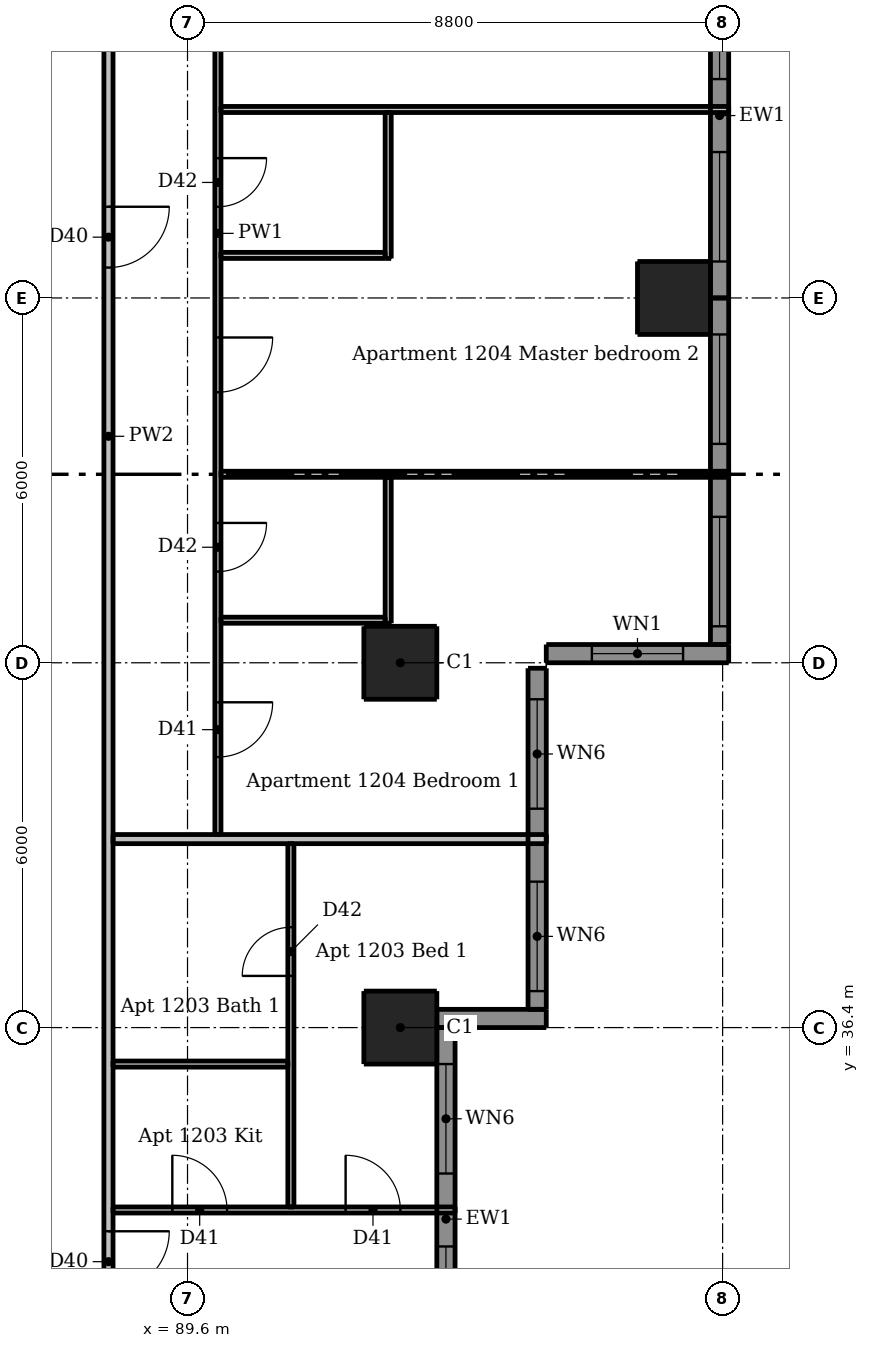
"""IFC4 building model, lengths in metres.
Left out: names, types, materials, properties, quantities, classifications, styles, units other than length and angle.
Written with IfcOpenShell. Run it as: python <this file> out.ifc"""

import sys

from ifc_helpers import new_model, si_unit, direction, frame, frame_2d, origin, origin_2d, place, context, subcontext, project, spatial, rectangle, extrude, element, fill, save


model = new_model("IFC4")
c1 = context("Model", 3, precision=1e-05, world=origin(), true_north=direction((0.0, 1.0)))
c2 = subcontext(c1, "Body", "Model", "MODEL_VIEW")
j1 = project(units=[si_unit("LENGTHUNIT", "METRE"), si_unit("PLANEANGLEUNIT", "RADIAN")], contexts=[c1])
p1 = place(None, origin())
s1 = spatial("IfcSite", under=j1, at=p1, CompositionType="ELEMENT")
p2 = place(p1, origin())
s2 = spatial("IfcBuilding", under=s1, at=p2, CompositionType="ELEMENT")
p3 = place(p2, frame((0.0, 0.0, 46.6)))
s3 = spatial("IfcBuildingStorey", under=s2, at=p3, CompositionType="ELEMENT", Elevation=46.6)
for number, where, z_axis, x_axis in (
    (1, (93.1, 36.4, 0.0), (0.0, 0.0, 1.0), (1.0, 0.0, 0.0)),
    (2, (93.1, 42.4, 0.0), (0.0, 0.0, 1.0), (1.0, 0.0, 0.0)),
    (3, (97.6, 48.4, 0.0), (0.0, 0.0, 1.0), (1.0, 0.0, 0.0)),
):
    element("IfcColumn", number, at=place(p3, frame(where, z_axis=z_axis, x_axis=x_axis)), inside=s3, PredefinedType="COLUMN", context=c2, shape_type="SweptSolid", body=[
        extrude(rectangle(XDim=1.2, YDim=1.2, at=origin_2d()), origin(), (0.0, 0.0, 1.0), 3.05),
    ])
p4 = place(p3, frame((93.7, 36.55, 0.0), z_axis=(0.0, 0.0, 1.0), x_axis=(1.0, 0.0, 0.0)))
e4 = element("IfcWall", 4, at=p4, inside=s3, PredefinedType="SOLIDWALL", context=c2, shape_type="SweptSolid", body=[
    extrude(rectangle(XDim=1.8, YDim=0.3, at=frame_2d((0.9, 0.0))), origin(), (0.0, 0.0, 1.0), 3.05),
])
p5 = place(p3, frame((95.5, 42.55, 0.0), z_axis=(0.0, 0.0, 1.0), x_axis=(1.0, 0.0, 0.0)))
e5 = element("IfcWall", 5, at=p5, inside=s3, PredefinedType="SOLIDWALL", context=c2, shape_type="SweptSolid", body=[
    extrude(rectangle(XDim=3.0, YDim=0.3, at=frame_2d((1.5, 0.0))), origin(), (0.0, 0.0, 1.0), 3.05),
])
p6 = place(p5, frame((0.75, 0.0, 0.9)))
e6 = element("IfcOpeningElement", 6, at=p6, cuts=e5, PredefinedType="OPENING", context=c2, shape_type="SweptSolid", body=[
    extrude(rectangle(XDim=1.5, YDim=1.5, at=frame_2d((0.75, 0.75))), frame((0.0, 0.16, 0.0), z_axis=(0.0, -1.0, 0.0), x_axis=(1.0, 0.0, 0.0)), (0.0, 0.0, 1.0), 0.32),
])
p7 = place(p3, frame((93.85, 30.1, 0.0), z_axis=(0.0, 0.0, 1.0), x_axis=(0.0, 1.0, 0.0)))
e7 = element("IfcWall", 7, at=p7, inside=s3, PredefinedType="SOLIDWALL", context=c2, shape_type="SweptSolid", body=[
    extrude(rectangle(XDim=6.3, YDim=0.3, at=frame_2d((3.15, 0.0))), origin(), (0.0, 0.0, 1.0), 3.05),
])
p8 = place(p7, frame((0.9, 0.0, 0.15)))
e8 = element("IfcOpeningElement", 8, at=p8, cuts=e7, PredefinedType="OPENING", context=c2, shape_type="SweptSolid", body=[
    extrude(rectangle(XDim=1.8, YDim=2.1, at=frame_2d((0.9, 1.05))), frame((0.0, 0.16, 0.0), z_axis=(0.0, -1.0, 0.0), x_axis=(1.0, 0.0, 0.0)), (0.0, 0.0, 1.0), 0.32),
])
p9 = place(p7, frame((3.9, 0.0, 0.15)))
e9 = element("IfcOpeningElement", 9, at=p9, cuts=e7, PredefinedType="OPENING", context=c2, shape_type="SweptSolid", body=[
    extrude(rectangle(XDim=1.8, YDim=2.1, at=frame_2d((0.9, 1.05))), frame((0.0, 0.16, 0.0), z_axis=(0.0, -1.0, 0.0), x_axis=(1.0, 0.0, 0.0)), (0.0, 0.0, 1.0), 0.32),
])
p10 = place(p3, frame((95.35, 36.7, 0.0), z_axis=(0.0, 0.0, 1.0), x_axis=(0.0, 1.0, 0.0)))
e10 = element("IfcWall", 10, at=p10, inside=s3, PredefinedType="SOLIDWALL", context=c2, shape_type="SweptSolid", body=[
    extrude(rectangle(XDim=5.61, YDim=0.3, at=frame_2d((2.805, 0.0))), origin(), (0.0, 0.0, 1.0), 3.05),
])
p11 = place(p10, frame((0.3, 0.0, 0.15)))
e11 = element("IfcOpeningElement", 11, at=p11, cuts=e10, PredefinedType="OPENING", context=c2, shape_type="SweptSolid", body=[
    extrude(rectangle(XDim=1.8, YDim=2.1, at=frame_2d((0.9, 1.05))), frame((0.0, 0.16, 0.0), z_axis=(0.0, -1.0, 0.0), x_axis=(1.0, 0.0, 0.0)), (0.0, 0.0, 1.0), 0.32),
])
p12 = place(p10, frame((3.3, 0.0, 0.15)))
e12 = element("IfcOpeningElement", 12, at=p12, cuts=e10, PredefinedType="OPENING", context=c2, shape_type="SweptSolid", body=[
    extrude(rectangle(XDim=1.8, YDim=2.1, at=frame_2d((0.9, 1.05))), frame((0.0, 0.16, 0.0), z_axis=(0.0, -1.0, 0.0), x_axis=(1.0, 0.0, 0.0)), (0.0, 0.0, 1.0), 0.32),
])
p13 = place(p3, frame((98.35, 42.7, 0.0), z_axis=(0.0, 0.0, 1.0), x_axis=(0.0, 1.0, 0.0)))
e13 = element("IfcWall", 13, at=p13, inside=s3, PredefinedType="SOLIDWALL", context=c2, shape_type="SweptSolid", body=[
    extrude(rectangle(XDim=5.7, YDim=0.3, at=frame_2d((2.85, 0.0))), origin(), (0.0, 0.0, 1.0), 3.05),
])
p14 = place(p13, frame((0.3, 0.0, 0.15)))
e14 = element("IfcOpeningElement", 14, at=p14, cuts=e13, PredefinedType="OPENING", context=c2, shape_type="SweptSolid", body=[
    extrude(rectangle(XDim=1.8, YDim=2.1, at=frame_2d((0.9, 1.05))), frame((0.0, 0.16, 0.0), z_axis=(0.0, -1.0, 0.0), x_axis=(1.0, 0.0, 0.0)), (0.0, 0.0, 1.0), 0.32),
])
p15 = place(p13, frame((3.3, 0.0, 0.15)))
e15 = element("IfcOpeningElement", 15, at=p15, cuts=e13, PredefinedType="OPENING", context=c2, shape_type="SweptSolid", body=[
    extrude(rectangle(XDim=1.8, YDim=2.1, at=frame_2d((0.9, 1.05))), frame((0.0, 0.16, 0.0), z_axis=(0.0, -1.0, 0.0), x_axis=(1.0, 0.0, 0.0)), (0.0, 0.0, 1.0), 0.32),
])
p16 = place(p3, frame((98.35, 48.4, 0.0), z_axis=(0.0, 0.0, 1.0), x_axis=(0.0, 1.0, 0.0)))
e16 = element("IfcWall", 16, at=p16, inside=s3, PredefinedType="SOLIDWALL", context=c2, shape_type="SweptSolid", body=[
    extrude(rectangle(XDim=6.0, YDim=0.3, at=frame_2d((3.0, 0.0))), origin(), (0.0, 0.0, 1.0), 3.05),
])
p17 = place(p16, frame((0.6, 0.0, 0.15)))
e17 = element("IfcOpeningElement", 17, at=p17, cuts=e16, PredefinedType="OPENING", context=c2, shape_type="SweptSolid", body=[
    extrude(rectangle(XDim=1.8, YDim=2.1, at=frame_2d((0.9, 1.05))), frame((0.0, 0.16, 0.0), z_axis=(0.0, -1.0, 0.0), x_axis=(1.0, 0.0, 0.0)), (0.0, 0.0, 1.0), 0.32),
])
p18 = place(p16, frame((3.6, 0.0, 0.15)))
e18 = element("IfcOpeningElement", 18, at=p18, cuts=e16, PredefinedType="OPENING", context=c2, shape_type="SweptSolid", body=[
    extrude(rectangle(XDim=1.8, YDim=2.1, at=frame_2d((0.9, 1.05))), frame((0.0, 0.16, 0.0), z_axis=(0.0, -1.0, 0.0), x_axis=(1.0, 0.0, 0.0)), (0.0, 0.0, 1.0), 0.32),
])
p19 = place(p3, frame((90.1, 59.35, 0.0), z_axis=(0.0, 0.0, 1.0), x_axis=(0.0, -1.0, 0.0)))
e19 = element("IfcWall", 19, at=p19, inside=s3, PredefinedType="PARTITIONING", context=c2, shape_type="SweptSolid", body=[
    extrude(rectangle(XDim=19.775, YDim=0.1, at=frame_2d((9.888, 0.0))), origin(), (0.0, 0.0, 1.0), 3.05),
])
p20 = place(p19, frame((4.45, 0.0, 0.0)))
e20 = element("IfcOpeningElement", 20, at=p20, cuts=e19, PredefinedType="OPENING", context=c2, shape_type="SweptSolid", body=[
    extrude(rectangle(XDim=0.9, YDim=2.1, at=frame_2d((0.45, 1.05))), frame((0.0, 0.06, 0.0), z_axis=(0.0, -1.0, 0.0), x_axis=(1.0, 0.0, 0.0)), (0.0, 0.0, 1.0), 0.12),
])
p21 = place(p19, frame((0.55, 0.0, 0.0)))
e21 = element("IfcOpeningElement", 21, at=p21, cuts=e19, PredefinedType="OPENING", context=c2, shape_type="SweptSolid", body=[
    extrude(rectangle(XDim=0.9, YDim=2.1, at=frame_2d((0.45, 1.05))), frame((0.0, 0.06, 0.0), z_axis=(0.0, -1.0, 0.0), x_axis=(1.0, 0.0, 0.0)), (0.0, 0.0, 1.0), 0.12),
])
p22 = place(p19, frame((17.6, 0.0, 0.0)))
e22 = element("IfcOpeningElement", 22, at=p22, cuts=e19, PredefinedType="OPENING", context=c2, shape_type="SweptSolid", body=[
    extrude(rectangle(XDim=0.9, YDim=2.1, at=frame_2d((0.45, 1.05))), frame((0.0, 0.06, 0.0), z_axis=(0.0, -1.0, 0.0), x_axis=(1.0, 0.0, 0.0)), (0.0, 0.0, 1.0), 0.12),
])
p23 = place(p19, frame((11.6, 0.0, 0.0)))
e23 = element("IfcOpeningElement", 23, at=p23, cuts=e19, PredefinedType="OPENING", context=c2, shape_type="SweptSolid", body=[
    extrude(rectangle(XDim=0.9, YDim=2.1, at=frame_2d((0.45, 1.05))), frame((0.0, 0.06, 0.0), z_axis=(0.0, -1.0, 0.0), x_axis=(1.0, 0.0, 0.0)), (0.0, 0.0, 1.0), 0.12),
])
p24 = place(p19, frame((14.65, 0.0, 0.0)))
e24 = element("IfcOpeningElement", 24, at=p24, cuts=e19, PredefinedType="OPENING", context=c2, shape_type="SweptSolid", body=[
    extrude(rectangle(XDim=0.8, YDim=2.1, at=frame_2d((0.4, 1.05))), frame((0.0, 0.06, 0.0), z_axis=(0.0, -1.0, 0.0), x_axis=(1.0, 0.0, 0.0)), (0.0, 0.0, 1.0), 0.12),
])
p25 = place(p19, frame((8.65, 0.0, 0.0)))
e25 = element("IfcOpeningElement", 25, at=p25, cuts=e19, PredefinedType="OPENING", context=c2, shape_type="SweptSolid", body=[
    extrude(rectangle(XDim=0.8, YDim=2.1, at=frame_2d((0.4, 1.05))), frame((0.0, 0.06, 0.0), z_axis=(0.0, -1.0, 0.0), x_axis=(1.0, 0.0, 0.0)), (0.0, 0.0, 1.0), 0.12),
])
p26 = place(p3, frame((91.3, 33.45, 0.0), z_axis=(0.0, 0.0, 1.0), x_axis=(0.0, 1.0, 0.0)))
e26 = element("IfcWall", 26, at=p26, inside=s3, PredefinedType="PARTITIONING", context=c2, shape_type="SweptSolid", body=[
    extrude(rectangle(XDim=5.975, YDim=0.1, at=frame_2d((2.988, 0.0))), origin(), (0.0, 0.0, 1.0), 3.05),
])
p27 = place(p26, frame((3.8, 0.0, 0.0)))
e27 = element("IfcOpeningElement", 27, at=p27, cuts=e26, PredefinedType="OPENING", context=c2, shape_type="SweptSolid", body=[
    extrude(rectangle(XDim=0.8, YDim=2.1, at=frame_2d((0.4, 1.05))), frame((0.0, 0.06, 0.0), z_axis=(0.0, -1.0, 0.0), x_axis=(1.0, 0.0, 0.0)), (0.0, 0.0, 1.0), 0.12),
])
for number, where, z_axis, x_axis in (
    (28, (92.9, 43.05, 0.0), (0.0, 0.0, 1.0), (0.0, 1.0, 0.0)),
    (29, (92.9, 49.05, 0.0), (0.0, 0.0, 1.0), (0.0, 1.0, 0.0)),
):
    element("IfcWall", number, at=place(p3, frame(where, z_axis=z_axis, x_axis=x_axis)), inside=s3, PredefinedType="PARTITIONING", context=c2, shape_type="SweptSolid", body=[
        extrude(rectangle(XDim=2.4, YDim=0.1, at=frame_2d((1.2, 0.0))), origin(), (0.0, 0.0, 1.0), 3.05),
    ])
p28 = place(p3, frame((90.15, 51.5, 0.0), z_axis=(0.0, 0.0, 1.0), x_axis=(1.0, 0.0, 0.0)))
e30 = element("IfcWall", 30, at=p28, inside=s3, PredefinedType="PARTITIONING", context=c2, shape_type="SweptSolid", body=[
    extrude(rectangle(XDim=8.35, YDim=0.1, at=frame_2d((4.175, 0.0))), origin(), (0.0, 0.0, 1.0), 3.05),
])
p29 = place(p3, frame((90.15, 49.1, 0.0), z_axis=(0.0, 0.0, 1.0), x_axis=(1.0, 0.0, 0.0)))
e31 = element("IfcWall", 31, at=p29, inside=s3, PredefinedType="PARTITIONING", context=c2, shape_type="SweptSolid", body=[
    extrude(rectangle(XDim=2.7, YDim=0.1, at=frame_2d((1.35, 0.0))), origin(), (0.0, 0.0, 1.0), 3.05),
])
p30 = place(p3, frame((90.15, 45.5, 0.0), z_axis=(0.0, 0.0, 1.0), x_axis=(1.0, 0.0, 0.0)))
e32 = element("IfcWall", 32, at=p30, inside=s3, PredefinedType="PARTITIONING", context=c2, shape_type="SweptSolid", body=[
    extrude(rectangle(XDim=8.35, YDim=0.1, at=frame_2d((4.175, 0.0))), origin(), (0.0, 0.0, 1.0), 3.05),
])
p31 = place(p3, frame((90.15, 43.1, 0.0), z_axis=(0.0, 0.0, 1.0), x_axis=(1.0, 0.0, 0.0)))
e33 = element("IfcWall", 33, at=p31, inside=s3, PredefinedType="PARTITIONING", context=c2, shape_type="SweptSolid", body=[
    extrude(rectangle(XDim=2.7, YDim=0.1, at=frame_2d((1.35, 0.0))), origin(), (0.0, 0.0, 1.0), 3.05),
])
p32 = place(p3, frame((88.375, 35.8, 0.0), z_axis=(0.0, 0.0, 1.0), x_axis=(1.0, 0.0, 0.0)))
e34 = element("IfcWall", 34, at=p32, inside=s3, PredefinedType="PARTITIONING", context=c2, shape_type="SweptSolid", body=[
    extrude(rectangle(XDim=2.875, YDim=0.1, at=frame_2d((1.438, 0.0))), origin(), (0.0, 0.0, 1.0), 3.05),
])
p33 = place(p3, frame((88.375, 33.4, 0.0), z_axis=(0.0, 0.0, 1.0), x_axis=(1.0, 0.0, 0.0)))
e35 = element("IfcWall", 35, at=p33, inside=s3, PredefinedType="PARTITIONING", context=c2, shape_type="SweptSolid", body=[
    extrude(rectangle(XDim=5.625, YDim=0.1, at=frame_2d((2.812, 0.0))), origin(), (0.0, 0.0, 1.0), 3.05),
])
p34 = place(p33, frame((0.975, 0.0, 0.0)))
e36 = element("IfcOpeningElement", 36, at=p34, cuts=e35, PredefinedType="OPENING", context=c2, shape_type="SweptSolid", body=[
    extrude(rectangle(XDim=0.9, YDim=2.1, at=frame_2d((0.45, 1.05))), frame((0.0, 0.06, 0.0), z_axis=(0.0, -1.0, 0.0), x_axis=(1.0, 0.0, 0.0)), (0.0, 0.0, 1.0), 0.12),
])
p35 = place(p33, frame((3.825, 0.0, 0.0)))
e37 = element("IfcOpeningElement", 37, at=p35, cuts=e35, PredefinedType="OPENING", context=c2, shape_type="SweptSolid", body=[
    extrude(rectangle(XDim=0.9, YDim=2.1, at=frame_2d((0.45, 1.05))), frame((0.0, 0.06, 0.0), z_axis=(0.0, -1.0, 0.0), x_axis=(1.0, 0.0, 0.0)), (0.0, 0.0, 1.0), 0.12),
])
p36 = place(p3, frame((88.3, 60.475, 0.0), z_axis=(0.0, 0.0, 1.0), x_axis=(0.0, -1.0, 0.0)))
e38 = element("IfcWall", 38, at=p36, inside=s3, PredefinedType="PARTITIONING", context=c2, shape_type="SweptSolid", body=[
    extrude(rectangle(XDim=28.7, YDim=0.15, at=frame_2d((14.35, 0.0))), origin(), (0.0, 0.0, 1.0), 3.05),
])
p37 = place(p36, frame((27.425, 0.0, 0.0)))
e39 = element("IfcOpeningElement", 39, at=p37, cuts=e38, PredefinedType="OPENING", context=c2, shape_type="SweptSolid", body=[
    extrude(rectangle(XDim=1.0, YDim=2.1, at=frame_2d((0.5, 1.05))), frame((0.0, 0.085, 0.0), z_axis=(0.0, -1.0, 0.0), x_axis=(1.0, 0.0, 0.0)), (0.0, 0.0, 1.0), 0.17),
])
p38 = place(p36, frame((10.575, 0.0, 0.0)))
e40 = element("IfcOpeningElement", 40, at=p38, cuts=e38, PredefinedType="OPENING", context=c2, shape_type="SweptSolid", body=[
    extrude(rectangle(XDim=1.0, YDim=2.1, at=frame_2d((0.5, 1.05))), frame((0.0, 0.085, 0.0), z_axis=(0.0, -1.0, 0.0), x_axis=(1.0, 0.0, 0.0)), (0.0, 0.0, 1.0), 0.17),
])
p39 = place(p3, frame((88.375, 39.5, 0.0), z_axis=(0.0, 0.0, 1.0), x_axis=(1.0, 0.0, 0.0)))
e41 = element("IfcWall", 41, at=p39, inside=s3, PredefinedType="PARTITIONING", context=c2, shape_type="SweptSolid", body=[
    extrude(rectangle(XDim=7.125, YDim=0.15, at=frame_2d((3.562, 0.0))), origin(), (0.0, 0.0, 1.0), 3.05),
])
p40 = place(p6, origin())
e42 = element("IfcWindow", 42, at=p40, inside=s3, PartitioningType="DOUBLE_PANEL_VERTICAL", PredefinedType="WINDOW", context=c2, shape_type="SweptSolid", body=[
    extrude(rectangle(XDim=1.5, YDim=1.5, at=frame_2d((0.75, 0.75))), frame((0.0, 0.03, 0.0), z_axis=(0.0, -1.0, 0.0), x_axis=(1.0, 0.0, 0.0)), (0.0, 0.0, 1.0), 0.06),
])
fill(e6, e42)
p41 = place(p8, origin())
e43 = element("IfcWindow", 43, at=p41, inside=s3, PartitioningType="DOUBLE_PANEL_VERTICAL", PredefinedType="WINDOW", context=c2, shape_type="SweptSolid", body=[
    extrude(rectangle(XDim=1.8, YDim=2.1, at=frame_2d((0.9, 1.05))), frame((0.0, 0.03, 0.0), z_axis=(0.0, -1.0, 0.0), x_axis=(1.0, 0.0, 0.0)), (0.0, 0.0, 1.0), 0.06),
])
fill(e8, e43)
p42 = place(p9, origin())
e44 = element("IfcWindow", 44, at=p42, inside=s3, PartitioningType="DOUBLE_PANEL_VERTICAL", PredefinedType="WINDOW", context=c2, shape_type="SweptSolid", body=[
    extrude(rectangle(XDim=1.8, YDim=2.1, at=frame_2d((0.9, 1.05))), frame((0.0, 0.03, 0.0), z_axis=(0.0, -1.0, 0.0), x_axis=(1.0, 0.0, 0.0)), (0.0, 0.0, 1.0), 0.06),
])
fill(e9, e44)
p43 = place(p11, origin())
e45 = element("IfcWindow", 45, at=p43, inside=s3, PartitioningType="DOUBLE_PANEL_VERTICAL", PredefinedType="WINDOW", context=c2, shape_type="SweptSolid", body=[
    extrude(rectangle(XDim=1.8, YDim=2.1, at=frame_2d((0.9, 1.05))), frame((0.0, 0.03, 0.0), z_axis=(0.0, -1.0, 0.0), x_axis=(1.0, 0.0, 0.0)), (0.0, 0.0, 1.0), 0.06),
])
fill(e11, e45)
p44 = place(p12, origin())
e46 = element("IfcWindow", 46, at=p44, inside=s3, PartitioningType="DOUBLE_PANEL_VERTICAL", PredefinedType="WINDOW", context=c2, shape_type="SweptSolid", body=[
    extrude(rectangle(XDim=1.8, YDim=2.1, at=frame_2d((0.9, 1.05))), frame((0.0, 0.03, 0.0), z_axis=(0.0, -1.0, 0.0), x_axis=(1.0, 0.0, 0.0)), (0.0, 0.0, 1.0), 0.06),
])
fill(e12, e46)
p45 = place(p14, origin())
e47 = element("IfcWindow", 47, at=p45, inside=s3, PartitioningType="DOUBLE_PANEL_VERTICAL", PredefinedType="WINDOW", context=c2, shape_type="SweptSolid", body=[
    extrude(rectangle(XDim=1.8, YDim=2.1, at=frame_2d((0.9, 1.05))), frame((0.0, 0.03, 0.0), z_axis=(0.0, -1.0, 0.0), x_axis=(1.0, 0.0, 0.0)), (0.0, 0.0, 1.0), 0.06),
])
fill(e14, e47)
p46 = place(p15, origin())
e48 = element("IfcWindow", 48, at=p46, inside=s3, PartitioningType="DOUBLE_PANEL_VERTICAL", PredefinedType="WINDOW", context=c2, shape_type="SweptSolid", body=[
    extrude(rectangle(XDim=1.8, YDim=2.1, at=frame_2d((0.9, 1.05))), frame((0.0, 0.03, 0.0), z_axis=(0.0, -1.0, 0.0), x_axis=(1.0, 0.0, 0.0)), (0.0, 0.0, 1.0), 0.06),
])
fill(e15, e48)
p47 = place(p17, origin())
e49 = element("IfcWindow", 49, at=p47, inside=s3, PartitioningType="DOUBLE_PANEL_VERTICAL", PredefinedType="WINDOW", context=c2, shape_type="SweptSolid", body=[
    extrude(rectangle(XDim=1.8, YDim=2.1, at=frame_2d((0.9, 1.05))), frame((0.0, 0.03, 0.0), z_axis=(0.0, -1.0, 0.0), x_axis=(1.0, 0.0, 0.0)), (0.0, 0.0, 1.0), 0.06),
])
fill(e17, e49)
p48 = place(p18, origin())
e50 = element("IfcWindow", 50, at=p48, inside=s3, PartitioningType="DOUBLE_PANEL_VERTICAL", PredefinedType="WINDOW", context=c2, shape_type="SweptSolid", body=[
    extrude(rectangle(XDim=1.8, YDim=2.1, at=frame_2d((0.9, 1.05))), frame((0.0, 0.03, 0.0), z_axis=(0.0, -1.0, 0.0), x_axis=(1.0, 0.0, 0.0)), (0.0, 0.0, 1.0), 0.06),
])
fill(e18, e50)
p49 = place(p37, origin())
e51 = element("IfcDoor", 51, at=p49, inside=s3, OperationType="SINGLE_SWING_LEFT", PredefinedType="DOOR", context=c2, shape_type="SweptSolid", body=[
    extrude(rectangle(XDim=1.0, YDim=2.1, at=frame_2d((0.5, 1.05))), frame((0.0, 0.025, 0.0), z_axis=(0.0, -1.0, 0.0), x_axis=(1.0, 0.0, 0.0)), (0.0, 0.0, 1.0), 0.05),
])
fill(e39, e51)
p50 = place(p34, origin())
e52 = element("IfcDoor", 52, at=p50, inside=s3, OperationType="SINGLE_SWING_LEFT", PredefinedType="DOOR", context=c2, shape_type="SweptSolid", body=[
    extrude(rectangle(XDim=0.9, YDim=2.1, at=frame_2d((0.45, 1.05))), frame((0.0, 0.025, 0.0), z_axis=(0.0, -1.0, 0.0), x_axis=(1.0, 0.0, 0.0)), (0.0, 0.0, 1.0), 0.05),
])
fill(e36, e52)
p51 = place(p35, origin())
e53 = element("IfcDoor", 53, at=p51, inside=s3, OperationType="SINGLE_SWING_LEFT", PredefinedType="DOOR", context=c2, shape_type="SweptSolid", body=[
    extrude(rectangle(XDim=0.9, YDim=2.1, at=frame_2d((0.45, 1.05))), frame((0.0, 0.025, 0.0), z_axis=(0.0, -1.0, 0.0), x_axis=(1.0, 0.0, 0.0)), (0.0, 0.0, 1.0), 0.05),
])
fill(e37, e53)
p52 = place(p27, origin())
e54 = element("IfcDoor", 54, at=p52, inside=s3, OperationType="SINGLE_SWING_LEFT", PredefinedType="DOOR", context=c2, shape_type="SweptSolid", body=[
    extrude(rectangle(XDim=0.8, YDim=2.1, at=frame_2d((0.4, 1.05))), frame((0.0, 0.025, 0.0), z_axis=(0.0, -1.0, 0.0), x_axis=(1.0, 0.0, 0.0)), (0.0, 0.0, 1.0), 0.05),
])
fill(e27, e54)
p53 = place(p38, origin())
e55 = element("IfcDoor", 55, at=p53, inside=s3, OperationType="SINGLE_SWING_LEFT", PredefinedType="DOOR", context=c2, shape_type="SweptSolid", body=[
    extrude(rectangle(XDim=1.0, YDim=2.1, at=frame_2d((0.5, 1.05))), frame((0.0, 0.025, 0.0), z_axis=(0.0, -1.0, 0.0), x_axis=(1.0, 0.0, 0.0)), (0.0, 0.0, 1.0), 0.05),
])
fill(e40, e55)
p54 = place(p22, origin())
e56 = element("IfcDoor", 56, at=p54, inside=s3, OperationType="SINGLE_SWING_LEFT", PredefinedType="DOOR", context=c2, shape_type="SweptSolid", body=[
    extrude(rectangle(XDim=0.9, YDim=2.1, at=frame_2d((0.45, 1.05))), frame((0.0, 0.025, 0.0), z_axis=(0.0, -1.0, 0.0), x_axis=(1.0, 0.0, 0.0)), (0.0, 0.0, 1.0), 0.05),
])
fill(e22, e56)
p55 = place(p23, origin())
e57 = element("IfcDoor", 57, at=p55, inside=s3, OperationType="SINGLE_SWING_LEFT", PredefinedType="DOOR", context=c2, shape_type="SweptSolid", body=[
    extrude(rectangle(XDim=0.9, YDim=2.1, at=frame_2d((0.45, 1.05))), frame((0.0, 0.025, 0.0), z_axis=(0.0, -1.0, 0.0), x_axis=(1.0, 0.0, 0.0)), (0.0, 0.0, 1.0), 0.05),
])
fill(e23, e57)
p56 = place(p24, origin())
e58 = element("IfcDoor", 58, at=p56, inside=s3, OperationType="SINGLE_SWING_LEFT", PredefinedType="DOOR", context=c2, shape_type="SweptSolid", body=[
    extrude(rectangle(XDim=0.8, YDim=2.1, at=frame_2d((0.4, 1.05))), frame((0.0, 0.025, 0.0), z_axis=(0.0, -1.0, 0.0), x_axis=(1.0, 0.0, 0.0)), (0.0, 0.0, 1.0), 0.05),
])
fill(e24, e58)
p57 = place(p25, origin())
e59 = element("IfcDoor", 59, at=p57, inside=s3, OperationType="SINGLE_SWING_LEFT", PredefinedType="DOOR", context=c2, shape_type="SweptSolid", body=[
    extrude(rectangle(XDim=0.8, YDim=2.1, at=frame_2d((0.4, 1.05))), frame((0.0, 0.025, 0.0), z_axis=(0.0, -1.0, 0.0), x_axis=(1.0, 0.0, 0.0)), (0.0, 0.0, 1.0), 0.05),
])
fill(e25, e59)
save(model, sys.argv[1])
